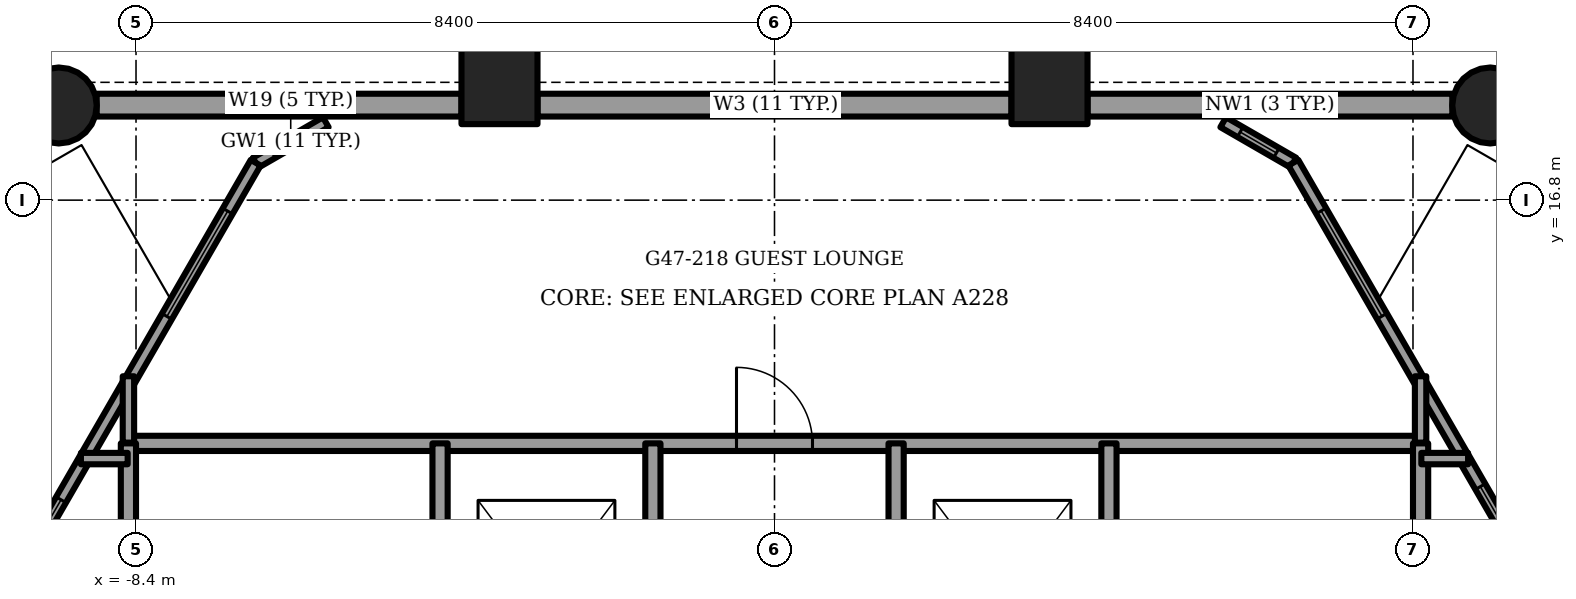
"""IFC4 building model, lengths in metres.
Left out: names, types, materials, properties, quantities, classifications, styles, units other than length and angle.
Written with IfcOpenShell. Run it as: python <this file> out.ifc"""

import sys

from ifc_helpers import new_model, si_unit, direction, frame, frame_2d, origin, origin_2d, place, context, subcontext, project, spatial, rectangle, circle, extrude, element, fill, save


model = new_model("IFC4")
c1 = context("Model", 3, precision=1e-05, world=origin(), true_north=direction((0.0, 1.0)))
c2 = subcontext(c1, "Body", "Model", "MODEL_VIEW")
j1 = project(units=[si_unit("LENGTHUNIT", "METRE"), si_unit("PLANEANGLEUNIT", "RADIAN")], contexts=[c1])
p1 = place(None, origin())
s1 = spatial("IfcSite", under=j1, at=p1, CompositionType="ELEMENT")
p2 = place(p1, origin())
s2 = spatial("IfcBuilding", under=s1, at=p2, CompositionType="ELEMENT")
p3 = place(p2, frame((0.0, 0.0, 190.75)))
s3 = spatial("IfcBuildingStorey", under=s2, at=p3, CompositionType="ELEMENT", Elevation=190.75)
for number, where, z_axis, x_axis in (
    (1, (-9.417, 18.045, -1.2), (0.0, 0.0, 1.0), (1.0, 0.0, 0.0)),
    (2, (9.417, 18.045, -1.2), (0.0, 0.0, 1.0), (1.0, 0.0, 0.0)),
):
    element("IfcColumn", number, at=place(p3, frame(where, z_axis=z_axis, x_axis=x_axis)), inside=s3, PredefinedType="COLUMN", context=c2, shape_type="SweptSolid", body=[
        extrude(circle(Radius=0.5, at=origin_2d()), origin(), (0.0, 0.0, 1.0), 3.75),
    ])
for number, where, z_axis, x_axis in (
    (3, (3.618, 18.3, -1.2), (0.0, 0.0, 1.0), (1.0, 0.0, 0.0)),
    (4, (-3.618, 18.3, -1.2), (0.0, 0.0, 1.0), (1.0, 0.0, 0.0)),
):
    element("IfcColumn", number, at=place(p3, frame(where, z_axis=z_axis, x_axis=x_axis)), inside=s3, PredefinedType="COLUMN", context=c2, shape_type="SweptSolid", body=[
        extrude(rectangle(XDim=1.0, YDim=1.0, at=origin_2d()), origin(), (0.0, 0.0, 1.0), 3.75),
    ])
for number, where, z_axis, x_axis in (
    (5, (-9.864, 17.88, 0.0), (0.0, 0.0, 1.0), (-0.5, -0.866, 0.0)),
    (6, (13.096, 12.282, 0.0), (0.0, 0.0, 1.0), (-0.5, 0.866, 0.0)),
):
    element("IfcWall", number, at=place(p3, frame(where, z_axis=z_axis, x_axis=x_axis)), inside=s3, PredefinedType="PARAPET", context=c2, shape_type="SweptSolid", body=[
        extrude(rectangle(XDim=6.465, YDim=0.9, at=frame_2d((3.232, 0.0))), origin(), (0.0, 0.0, 1.0), 1.1),
    ])
p4 = place(p3, frame((8.917, 18.05, 0.0), z_axis=(0.0, 0.0, 1.0), x_axis=(-1.0, 0.0, 0.0)))
e7 = element("IfcWall", 7, at=p4, inside=s3, PredefinedType="SOLIDWALL", context=c2, shape_type="SweptSolid", body=[
    extrude(rectangle(XDim=4.799, YDim=0.3, at=frame_2d((2.4, 0.0))), origin(), (0.0, 0.0, 1.0), 2.55),
])
p5 = place(p3, frame((3.118, 18.05, 0.0), z_axis=(0.0, 0.0, 1.0), x_axis=(-1.0, 0.0, 0.0)))
e8 = element("IfcWall", 8, at=p5, inside=s3, PredefinedType="SOLIDWALL", context=c2, shape_type="SweptSolid", body=[
    extrude(rectangle(XDim=6.236, YDim=0.3, at=frame_2d((3.118, 0.0))), origin(), (0.0, 0.0, 1.0), 2.55),
])
p6 = place(p5, frame((2.3, 0.0, 0.15)))
e9 = element("IfcOpeningElement", 9, at=p6, cuts=e8, PredefinedType="OPENING", context=c2, shape_type="SweptSolid", body=[
    extrude(rectangle(XDim=1.6, YDim=2.15, at=frame_2d((0.8, 1.075))), frame((0.0, 0.15, 0.0), z_axis=(0.0, -1.0, 0.0), x_axis=(1.0, 0.0, 0.0)), (0.0, 0.0, 1.0), 0.3),
])
p7 = place(p3, frame((-4.118, 18.05, 0.0), z_axis=(0.0, 0.0, 1.0), x_axis=(-1.0, 0.0, 0.0)))
e10 = element("IfcWall", 10, at=p7, inside=s3, PredefinedType="SOLIDWALL", context=c2, shape_type="SweptSolid", body=[
    extrude(rectangle(XDim=4.799, YDim=0.3, at=frame_2d((2.4, 0.0))), origin(), (0.0, 0.0, 1.0), 2.55),
])
p8 = place(p3, frame((-6.826, 17.292, 0.0), z_axis=(0.0, 0.0, 1.0), x_axis=(-0.50000659594, -0.866021595583, 0.0)))
e11 = element("IfcWall", 11, at=p8, inside=s3, PredefinedType="SOLIDWALL", context=c2, shape_type="SweptSolid", body=[
    extrude(rectangle(XDim=20.354, YDim=0.15, at=frame_2d((10.177, 0.0))), origin(), (0.0, 0.0, 1.0), 3.45),
])
p9 = place(p8, frame((5.12, 0.0, 0.15)))
e12 = element("IfcOpeningElement", 12, at=p9, cuts=e11, PredefinedType="OPENING", context=c2, shape_type="SweptSolid", body=[
    extrude(rectangle(XDim=1.4, YDim=2.85, at=frame_2d((0.7, 1.425))), frame((0.0, 0.075, 0.0), z_axis=(0.0, -1.0, 0.0), x_axis=(1.0, 0.0, 0.0)), (0.0, 0.0, 1.0), 0.15),
])
p10 = place(p8, frame((7.663, 0.0, 0.15)))
e13 = element("IfcOpeningElement", 13, at=p10, cuts=e11, PredefinedType="OPENING", context=c2, shape_type="SweptSolid", body=[
    extrude(rectangle(XDim=1.6, YDim=2.85, at=frame_2d((0.8, 1.425))), frame((0.0, 0.075, 0.0), z_axis=(0.0, -1.0, 0.0), x_axis=(1.0, 0.0, 0.0)), (0.0, 0.0, 1.0), 0.15),
])
p11 = place(p8, frame((9.863, 0.0, 0.15)))
e14 = element("IfcOpeningElement", 14, at=p11, cuts=e11, PredefinedType="OPENING", context=c2, shape_type="SweptSolid", body=[
    extrude(rectangle(XDim=1.4, YDim=2.85, at=frame_2d((0.7, 1.425))), frame((0.0, 0.075, 0.0), z_axis=(0.0, -1.0, 0.0), x_axis=(1.0, 0.0, 0.0)), (0.0, 0.0, 1.0), 0.15),
])
p12 = place(p8, frame((12.492, 0.0, 0.15)))
e15 = element("IfcOpeningElement", 15, at=p12, cuts=e11, PredefinedType="OPENING", context=c2, shape_type="SweptSolid", body=[
    extrude(rectangle(XDim=0.9, YDim=2.85, at=frame_2d((0.45, 1.425))), frame((0.0, 0.075, 0.0), z_axis=(0.0, -1.0, 0.0), x_axis=(1.0, 0.0, 0.0)), (0.0, 0.0, 1.0), 0.15),
])
p13 = place(p8, frame((14.063, 0.0, 0.0)))
e16 = element("IfcOpeningElement", 16, at=p13, cuts=e11, PredefinedType="OPENING", context=c2, shape_type="SweptSolid", body=[
    extrude(rectangle(XDim=1.4, YDim=2.4, at=frame_2d((0.7, 1.2))), frame((0.0, 0.075, 0.0), z_axis=(0.0, -1.0, 0.0), x_axis=(1.0, 0.0, 0.0)), (0.0, 0.0, 1.0), 0.15),
])
p14 = place(p8, frame((16.063, 0.0, 0.15)))
e17 = element("IfcOpeningElement", 17, at=p14, cuts=e11, PredefinedType="OPENING", context=c2, shape_type="SweptSolid", body=[
    extrude(rectangle(XDim=0.9, YDim=2.85, at=frame_2d((0.45, 1.425))), frame((0.0, 0.075, 0.0), z_axis=(0.0, -1.0, 0.0), x_axis=(1.0, 0.0, 0.0)), (0.0, 0.0, 1.0), 0.15),
])
p15 = place(p8, frame((17.116, 0.0, 0.0)))
e18 = element("IfcOpeningElement", 18, at=p15, cuts=e11, PredefinedType="OPENING", context=c2, shape_type="SweptSolid", body=[
    extrude(rectangle(XDim=1.4, YDim=2.4, at=frame_2d((0.7, 1.2))), frame((0.0, 0.075, 0.0), z_axis=(0.0, -1.0, 0.0), x_axis=(1.0, 0.0, 0.0)), (0.0, 0.0, 1.0), 0.15),
])
p16 = place(p8, frame((0.735, 0.0, 0.15)))
e19 = element("IfcOpeningElement", 19, at=p16, cuts=e11, PredefinedType="OPENING", context=c2, shape_type="SweptSolid", body=[
    extrude(rectangle(XDim=1.6, YDim=2.73, at=frame_2d((0.8, 1.365))), frame((0.0, 0.075, 0.0), z_axis=(0.0, -1.0, 0.0), x_axis=(1.0, 0.0, 0.0)), (0.0, 0.0, 1.0), 0.15),
])
p17 = place(p3, frame((17.003, -0.335, 0.0), z_axis=(0.0, 0.0, 1.0), x_axis=(-0.50000659594, 0.866021595583, 0.0)))
e20 = element("IfcWall", 20, at=p17, inside=s3, PredefinedType="SOLIDWALL", context=c2, shape_type="SweptSolid", body=[
    extrude(rectangle(XDim=20.354, YDim=0.15, at=frame_2d((10.177, 0.0))), origin(), (0.0, 0.0, 1.0), 3.45),
])
p18 = place(p17, frame((1.288, 0.0, 0.15)))
e21 = element("IfcOpeningElement", 21, at=p18, cuts=e20, PredefinedType="OPENING", context=c2, shape_type="SweptSolid", body=[
    extrude(rectangle(XDim=0.9, YDim=2.85, at=frame_2d((0.45, 1.425))), frame((0.0, 0.075, 0.0), z_axis=(0.0, -1.0, 0.0), x_axis=(1.0, 0.0, 0.0)), (0.0, 0.0, 1.0), 0.15),
])
p19 = place(p17, frame((2.892, 0.0, 0.0)))
e22 = element("IfcOpeningElement", 22, at=p19, cuts=e20, PredefinedType="OPENING", context=c2, shape_type="SweptSolid", body=[
    extrude(rectangle(XDim=1.4, YDim=2.4, at=frame_2d((0.7, 1.2))), frame((0.0, 0.075, 0.0), z_axis=(0.0, -1.0, 0.0), x_axis=(1.0, 0.0, 0.0)), (0.0, 0.0, 1.0), 0.15),
])
p20 = place(p17, frame((6.138, 0.0, 0.15)))
e23 = element("IfcOpeningElement", 23, at=p20, cuts=e20, PredefinedType="OPENING", context=c2, shape_type="SweptSolid", body=[
    extrude(rectangle(XDim=0.9, YDim=2.85, at=frame_2d((0.45, 1.425))), frame((0.0, 0.075, 0.0), z_axis=(0.0, -1.0, 0.0), x_axis=(1.0, 0.0, 0.0)), (0.0, 0.0, 1.0), 0.15),
])
p21 = place(p17, frame((7.092, 0.0, 0.15)))
e24 = element("IfcOpeningElement", 24, at=p21, cuts=e20, PredefinedType="OPENING", context=c2, shape_type="SweptSolid", body=[
    extrude(rectangle(XDim=1.4, YDim=2.85, at=frame_2d((0.7, 1.425))), frame((0.0, 0.075, 0.0), z_axis=(0.0, -1.0, 0.0), x_axis=(1.0, 0.0, 0.0)), (0.0, 0.0, 1.0), 0.15),
])
p22 = place(p17, frame((9.092, 0.0, 0.15)))
e25 = element("IfcOpeningElement", 25, at=p22, cuts=e20, PredefinedType="OPENING", context=c2, shape_type="SweptSolid", body=[
    extrude(rectangle(XDim=1.6, YDim=2.85, at=frame_2d((0.8, 1.425))), frame((0.0, 0.075, 0.0), z_axis=(0.0, -1.0, 0.0), x_axis=(1.0, 0.0, 0.0)), (0.0, 0.0, 1.0), 0.15),
])
p23 = place(p17, frame((11.292, 0.0, 0.15)))
e26 = element("IfcOpeningElement", 26, at=p23, cuts=e20, PredefinedType="OPENING", context=c2, shape_type="SweptSolid", body=[
    extrude(rectangle(XDim=1.4, YDim=2.85, at=frame_2d((0.7, 1.425))), frame((0.0, 0.075, 0.0), z_axis=(0.0, -1.0, 0.0), x_axis=(1.0, 0.0, 0.0)), (0.0, 0.0, 1.0), 0.15),
])
p24 = place(p17, frame((13.834, 0.0, 0.15)))
e27 = element("IfcOpeningElement", 27, at=p24, cuts=e20, PredefinedType="OPENING", context=c2, shape_type="SweptSolid", body=[
    extrude(rectangle(XDim=1.6, YDim=2.85, at=frame_2d((0.8, 1.425))), frame((0.0, 0.075, 0.0), z_axis=(0.0, -1.0, 0.0), x_axis=(1.0, 0.0, 0.0)), (0.0, 0.0, 1.0), 0.15),
])
p25 = place(p17, frame((18.023, 0.0, 0.15)))
e28 = element("IfcOpeningElement", 28, at=p25, cuts=e20, PredefinedType="OPENING", context=c2, shape_type="SweptSolid", body=[
    extrude(rectangle(XDim=1.6, YDim=2.73, at=frame_2d((0.8, 1.365))), frame((0.0, 0.075, 0.0), z_axis=(0.0, -1.0, 0.0), x_axis=(1.0, 0.0, 0.0)), (0.0, 0.0, 1.0), 0.15),
])
p26 = place(p3, frame((-5.904, 17.825, 0.0), z_axis=(0.0, 0.0, 1.0), x_axis=(-0.866048165231, -0.499960573946, 0.0)))
e29 = element("IfcWall", 29, at=p26, inside=s3, PredefinedType="SOLIDWALL", context=c2, shape_type="SweptSolid", body=[
    extrude(rectangle(XDim=1.065, YDim=0.15, at=frame_2d((0.532, 0.0))), origin(), (0.0, 0.0, 1.0), 3.45),
])
p27 = place(p26, frame((0.258, 0.0, 0.15)))
e30 = element("IfcOpeningElement", 30, at=p27, cuts=e29, PredefinedType="OPENING", context=c2, shape_type="SweptSolid", body=[
    extrude(rectangle(XDim=0.55, YDim=2.85, at=frame_2d((0.275, 1.425))), frame((0.0, 0.075, 0.0), z_axis=(0.0, -1.0, 0.0), x_axis=(1.0, 0.0, 0.0)), (0.0, 0.0, 1.0), 0.15),
])
p28 = place(p3, frame((6.826, 17.292, 0.0), z_axis=(0.0, 0.0, 1.0), x_axis=(-0.866048165231, 0.499960573946, 0.0)))
e31 = element("IfcWall", 31, at=p28, inside=s3, PredefinedType="SOLIDWALL", context=c2, shape_type="SweptSolid", body=[
    extrude(rectangle(XDim=1.065, YDim=0.15, at=frame_2d((0.532, 0.0))), origin(), (0.0, 0.0, 1.0), 3.45),
])
p29 = place(p28, frame((0.258, 0.0, 0.15)))
e32 = element("IfcOpeningElement", 32, at=p29, cuts=e31, PredefinedType="OPENING", context=c2, shape_type="SweptSolid", body=[
    extrude(rectangle(XDim=0.55, YDim=2.85, at=frame_2d((0.275, 1.425))), frame((0.0, 0.075, 0.0), z_axis=(0.0, -1.0, 0.0), x_axis=(1.0, 0.0, 0.0)), (0.0, 0.0, 1.0), 0.15),
])
p30 = place(p3, frame((-8.5, 13.6, 0.0), z_axis=(0.0, 0.0, 1.0), x_axis=(1.0, 0.0, 0.0)))
e33 = element("IfcWall", 33, at=p30, inside=s3, PredefinedType="PARTITIONING", context=c2, shape_type="SweptSolid", body=[
    extrude(rectangle(XDim=17.0, YDim=0.2, at=frame_2d((8.5, 0.0))), origin(), (0.0, 0.0, 1.0), 3.45),
])
p31 = place(p30, frame((8.0, 0.0, 0.0)))
e34 = element("IfcOpeningElement", 34, at=p31, cuts=e33, PredefinedType="OPENING", context=c2, shape_type="SweptSolid", body=[
    extrude(rectangle(XDim=1.0, YDim=2.1, at=frame_2d((0.5, 1.05))), frame((0.0, 0.1, 0.0), z_axis=(0.0, -1.0, 0.0), x_axis=(1.0, 0.0, 0.0)), (0.0, 0.0, 1.0), 0.2),
])
p32 = place(p3, frame((-8.5, 9.7, 0.0), z_axis=(0.0, 0.0, 1.0), x_axis=(0.0, 1.0, 0.0)))
e35 = element("IfcWall", 35, at=p32, inside=s3, PredefinedType="PARTITIONING", context=c2, shape_type="SweptSolid", body=[
    extrude(rectangle(XDim=3.9, YDim=0.2, at=frame_2d((1.95, 0.0))), origin(), (0.0, 0.0, 1.0), 3.45),
])
p33 = place(p32, frame((1.35, 0.0, 0.0)))
e36 = element("IfcOpeningElement", 36, at=p33, cuts=e35, PredefinedType="OPENING", context=c2, shape_type="SweptSolid", body=[
    extrude(rectangle(XDim=1.2, YDim=2.1, at=frame_2d((0.6, 1.05))), frame((0.0, 0.1, 0.0), z_axis=(0.0, -1.0, 0.0), x_axis=(1.0, 0.0, 0.0)), (0.0, 0.0, 1.0), 0.2),
])
p34 = place(p3, frame((8.5, 9.7, 0.0), z_axis=(0.0, 0.0, 1.0), x_axis=(0.0, 1.0, 0.0)))
e37 = element("IfcWall", 37, at=p34, inside=s3, PredefinedType="PARTITIONING", context=c2, shape_type="SweptSolid", body=[
    extrude(rectangle(XDim=3.9, YDim=0.2, at=frame_2d((1.95, 0.0))), origin(), (0.0, 0.0, 1.0), 3.45),
])
p35 = place(p34, frame((1.35, 0.0, 0.0)))
e38 = element("IfcOpeningElement", 38, at=p35, cuts=e37, PredefinedType="OPENING", context=c2, shape_type="SweptSolid", body=[
    extrude(rectangle(XDim=1.2, YDim=2.1, at=frame_2d((0.6, 1.05))), frame((0.0, 0.1, 0.0), z_axis=(0.0, -1.0, 0.0), x_axis=(1.0, 0.0, 0.0)), (0.0, 0.0, 1.0), 0.2),
])
p36 = place(p3, frame((-4.4, 9.7, 0.0), z_axis=(0.0, 0.0, 1.0), x_axis=(0.0, 1.0, 0.0)))
e39 = element("IfcWall", 39, at=p36, inside=s3, PredefinedType="PARTITIONING", context=c2, shape_type="SweptSolid", body=[
    extrude(rectangle(XDim=3.9, YDim=0.2, at=frame_2d((1.95, 0.0))), origin(), (0.0, 0.0, 1.0), 3.45),
])
p37 = place(p36, frame((1.35, 0.0, 0.0)))
e40 = element("IfcOpeningElement", 40, at=p37, cuts=e39, PredefinedType="OPENING", context=c2, shape_type="SweptSolid", body=[
    extrude(rectangle(XDim=1.2, YDim=2.1, at=frame_2d((0.6, 1.05))), frame((0.0, 0.1, 0.0), z_axis=(0.0, -1.0, 0.0), x_axis=(1.0, 0.0, 0.0)), (0.0, 0.0, 1.0), 0.2),
])
p38 = place(p3, frame((4.4, 9.7, 0.0), z_axis=(0.0, 0.0, 1.0), x_axis=(0.0, 1.0, 0.0)))
e41 = element("IfcWall", 41, at=p38, inside=s3, PredefinedType="PARTITIONING", context=c2, shape_type="SweptSolid", body=[
    extrude(rectangle(XDim=3.9, YDim=0.2, at=frame_2d((1.95, 0.0))), origin(), (0.0, 0.0, 1.0), 3.45),
])
p39 = place(p38, frame((1.35, 0.0, 0.0)))
e42 = element("IfcOpeningElement", 42, at=p39, cuts=e41, PredefinedType="OPENING", context=c2, shape_type="SweptSolid", body=[
    extrude(rectangle(XDim=1.2, YDim=2.1, at=frame_2d((0.6, 1.05))), frame((0.0, 0.1, 0.0), z_axis=(0.0, -1.0, 0.0), x_axis=(1.0, 0.0, 0.0)), (0.0, 0.0, 1.0), 0.2),
])
for number, where, z_axis, x_axis in (
    (43, (-1.6, 9.7, 0.0), (0.0, 0.0, 1.0), (0.0, 1.0, 0.0)),
    (44, (1.6, 9.7, 0.0), (0.0, 0.0, 1.0), (0.0, 1.0, 0.0)),
):
    element("IfcWall", number, at=place(p3, frame(where, z_axis=z_axis, x_axis=x_axis)), inside=s3, PredefinedType="PARTITIONING", context=c2, shape_type="SweptSolid", body=[
        extrude(rectangle(XDim=3.9, YDim=0.2, at=frame_2d((1.95, 0.0))), origin(), (0.0, 0.0, 1.0), 3.45),
    ])
for number, where, z_axis, x_axis in (
    (45, (-9.125, 13.4, 0.0), (0.0, 0.0, 1.0), (1.0, 0.0, 0.0)),
    (46, (8.51, 13.4, 0.0), (0.0, 0.0, 1.0), (1.0, 0.0, 0.0)),
):
    element("IfcWall", number, at=place(p3, frame(where, z_axis=z_axis, x_axis=x_axis)), inside=s3, PredefinedType="PARTITIONING", context=c2, shape_type="SweptSolid", body=[
        extrude(rectangle(XDim=0.615, YDim=0.15, at=frame_2d((0.308, 0.0))), origin(), (0.0, 0.0, 1.0), 3.45),
    ])
for number, where, z_axis, x_axis in (
    (47, (8.5, 13.61, 0.0), (0.0, 0.0, 1.0), (0.0, 1.0, 0.0)),
    (48, (-8.5, 13.61, 0.0), (0.0, 0.0, 1.0), (0.0, 1.0, 0.0)),
):
    element("IfcWall", number, at=place(p3, frame(where, z_axis=z_axis, x_axis=x_axis)), inside=s3, PredefinedType="PARTITIONING", context=c2, shape_type="SweptSolid", body=[
        extrude(rectangle(XDim=0.873, YDim=0.15, at=frame_2d((0.437, 0.0))), origin(), (0.0, 0.0, 1.0), 3.45),
    ])
p40 = place(p6, origin())
e49 = element("IfcWindow", 49, at=p40, inside=s3, PartitioningType="SINGLE_PANEL", PredefinedType="WINDOW", context=c2, shape_type="SweptSolid", body=[
    extrude(rectangle(XDim=1.6, YDim=2.15, at=frame_2d((0.8, 1.075))), frame((0.0, 0.03, 0.0), z_axis=(0.0, -1.0, 0.0), x_axis=(1.0, 0.0, 0.0)), (0.0, 0.0, 1.0), 0.06),
])
fill(e9, e49)
p41 = place(p9, origin())
e50 = element("IfcWindow", 50, at=p41, inside=s3, PartitioningType="SINGLE_PANEL", PredefinedType="WINDOW", context=c2, shape_type="SweptSolid", body=[
    extrude(rectangle(XDim=1.4, YDim=2.85, at=frame_2d((0.7, 1.425))), frame((0.0, 0.03, 0.0), z_axis=(0.0, -1.0, 0.0), x_axis=(1.0, 0.0, 0.0)), (0.0, 0.0, 1.0), 0.06),
])
fill(e12, e50)
p42 = place(p16, origin())
e51 = element("IfcWindow", 51, at=p42, inside=s3, PartitioningType="SINGLE_PANEL", PredefinedType="WINDOW", context=c2, shape_type="SweptSolid", body=[
    extrude(rectangle(XDim=1.6, YDim=2.73, at=frame_2d((0.8, 1.365))), frame((0.0, 0.03, 0.0), z_axis=(0.0, -1.0, 0.0), x_axis=(1.0, 0.0, 0.0)), (0.0, 0.0, 1.0), 0.06),
])
fill(e19, e51)
p43 = place(p24, origin())
e52 = element("IfcWindow", 52, at=p43, inside=s3, PartitioningType="SINGLE_PANEL", PredefinedType="WINDOW", context=c2, shape_type="SweptSolid", body=[
    extrude(rectangle(XDim=1.6, YDim=2.85, at=frame_2d((0.8, 1.425))), frame((0.0, 0.03, 0.0), z_axis=(0.0, -1.0, 0.0), x_axis=(1.0, 0.0, 0.0)), (0.0, 0.0, 1.0), 0.06),
])
fill(e27, e52)
p44 = place(p25, origin())
e53 = element("IfcWindow", 53, at=p44, inside=s3, PartitioningType="SINGLE_PANEL", PredefinedType="WINDOW", context=c2, shape_type="SweptSolid", body=[
    extrude(rectangle(XDim=1.6, YDim=2.73, at=frame_2d((0.8, 1.365))), frame((0.0, 0.03, 0.0), z_axis=(0.0, -1.0, 0.0), x_axis=(1.0, 0.0, 0.0)), (0.0, 0.0, 1.0), 0.06),
])
fill(e28, e53)
p45 = place(p27, origin())
e54 = element("IfcWindow", 54, at=p45, inside=s3, PartitioningType="SINGLE_PANEL", PredefinedType="WINDOW", context=c2, shape_type="SweptSolid", body=[
    extrude(rectangle(XDim=0.55, YDim=2.85, at=frame_2d((0.275, 1.425))), frame((0.0, 0.03, 0.0), z_axis=(0.0, -1.0, 0.0), x_axis=(1.0, 0.0, 0.0)), (0.0, 0.0, 1.0), 0.06),
])
fill(e30, e54)
p46 = place(p29, origin())
e55 = element("IfcWindow", 55, at=p46, inside=s3, PartitioningType="SINGLE_PANEL", PredefinedType="WINDOW", context=c2, shape_type="SweptSolid", body=[
    extrude(rectangle(XDim=0.55, YDim=2.85, at=frame_2d((0.275, 1.425))), frame((0.0, 0.03, 0.0), z_axis=(0.0, -1.0, 0.0), x_axis=(1.0, 0.0, 0.0)), (0.0, 0.0, 1.0), 0.06),
])
fill(e32, e55)
p47 = place(p31, origin())
e56 = element("IfcDoor", 56, at=p47, inside=s3, OperationType="SINGLE_SWING_LEFT", PredefinedType="DOOR", context=c2, shape_type="SweptSolid", body=[
    extrude(rectangle(XDim=1.0, YDim=2.1, at=frame_2d((0.5, 1.05))), frame((0.0, 0.025, 0.0), z_axis=(0.0, -1.0, 0.0), x_axis=(1.0, 0.0, 0.0)), (0.0, 0.0, 1.0), 0.05),
])
fill(e34, e56)
save(model, sys.argv[1])
